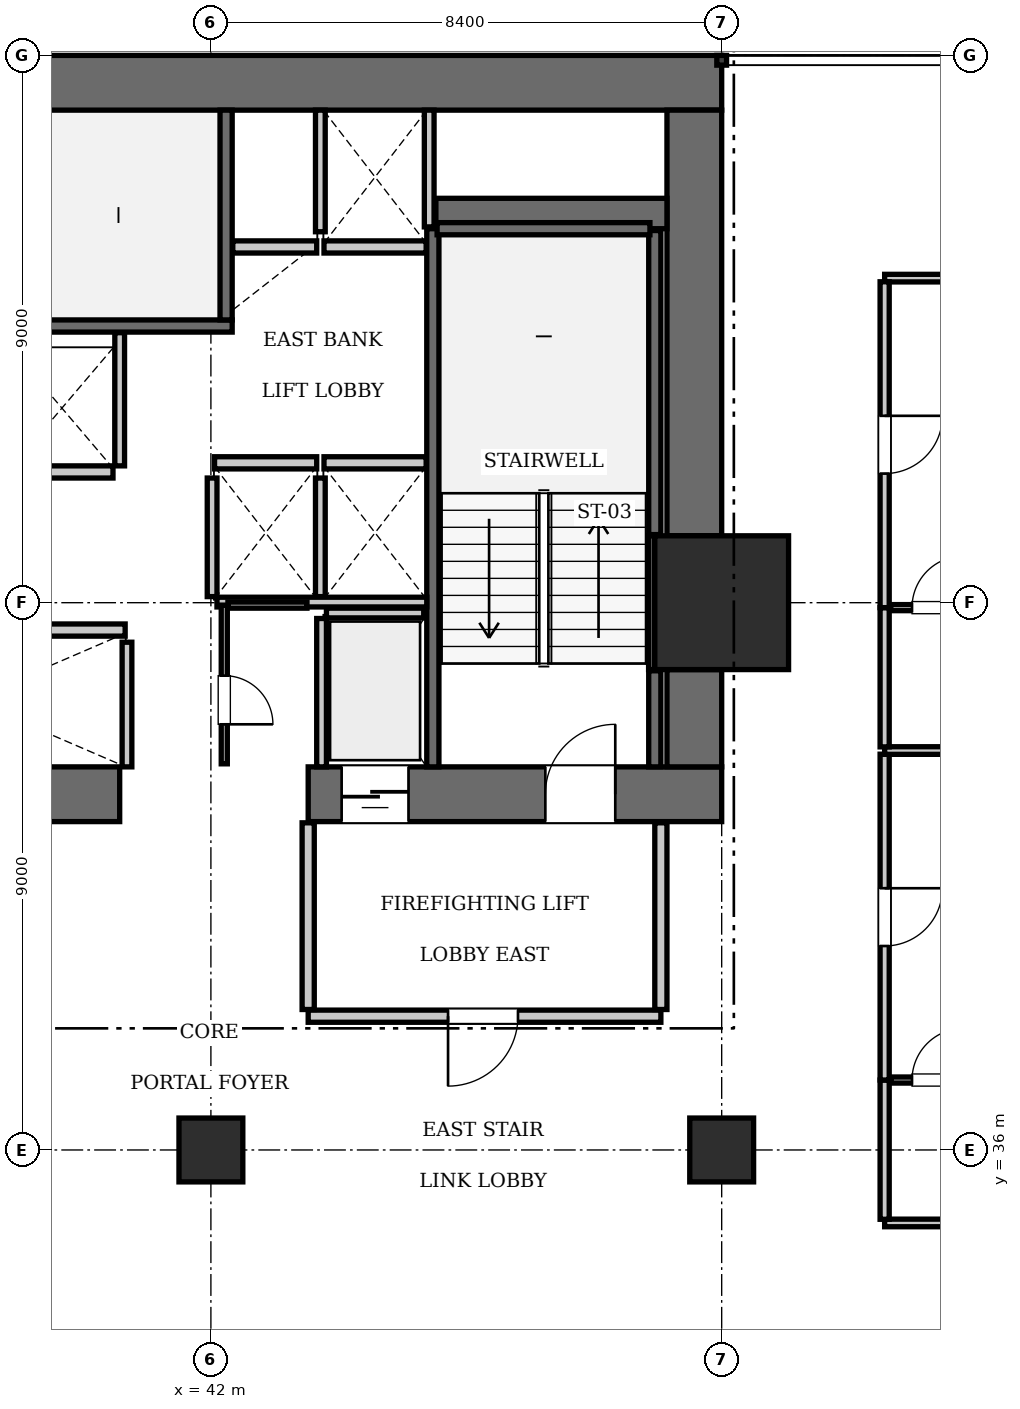
"""IFC4 building model, lengths in metres.
Left out: names, types, materials, properties, quantities, classifications, styles, units other than length and angle.
Written with IfcOpenShell. Run it as: python <this file> out.ifc"""

import sys

from ifc_helpers import new_model, si_unit, direction, frame, frame_2d, origin, origin_2d, place, context, subcontext, project, spatial, rectangle, extrude, element, fill, save


model = new_model("IFC4")
c1 = context("Model", 3, precision=1e-05, world=origin(), true_north=direction((0.0, 1.0)))
c2 = subcontext(c1, "Body", "Model", "MODEL_VIEW")
j1 = project(units=[si_unit("LENGTHUNIT", "METRE"), si_unit("PLANEANGLEUNIT", "RADIAN")], contexts=[c1])
p1 = place(None, origin())
s1 = spatial("IfcSite", under=j1, at=p1, CompositionType="ELEMENT")
p2 = place(p1, origin())
s2 = spatial("IfcBuilding", under=s1, at=p2, CompositionType="ELEMENT")
p3 = place(p2, frame((0.0, 0.0, 92.4)))
s3 = spatial("IfcBuildingStorey", under=s2, at=p3, CompositionType="ELEMENT", Elevation=92.4)
p4 = place(p3, frame((50.4, 45.0, 0.0), z_axis=(0.0, 0.0, 1.0), x_axis=(1.0, 0.0, 0.0)))
e1 = element("IfcColumn", 1, at=p4, inside=s3, PredefinedType="COLUMN", context=c2, shape_type="SweptSolid", body=[
    extrude(rectangle(XDim=2.2, YDim=2.2, at=origin_2d()), origin(), (0.0, 0.0, 1.0), 3.85),
])
p5 = place(p3, frame((25.2, 53.55, 0.0), z_axis=(0.0, 0.0, 1.0), x_axis=(1.0, 0.0, 0.0)))
e2 = element("IfcWall", 2, at=p5, inside=s3, PredefinedType="SHEAR", context=c2, shape_type="SweptSolid", body=[
    extrude(rectangle(XDim=25.2, YDim=0.9, at=frame_2d((12.6, 0.0))), origin(), (0.0, 0.0, 1.0), 3.85),
])
p6 = place(p3, frame((35.1, 41.85, 0.0), z_axis=(0.0, 0.0, 1.0), x_axis=(1.0, 0.0, 0.0)))
e3 = element("IfcWall", 3, at=p6, inside=s3, PredefinedType="SHEAR", context=c2, shape_type="SweptSolid", body=[
    extrude(rectangle(XDim=5.4, YDim=0.9, at=frame_2d((2.7, 0.0))), origin(), (0.0, 0.0, 1.0), 3.85),
])
p7 = place(p3, frame((43.6, 41.85, 0.0), z_axis=(0.0, 0.0, 1.0), x_axis=(1.0, 0.0, 0.0)))
e4 = element("IfcWall", 4, at=p7, inside=s3, PredefinedType="SHEAR", context=c2, shape_type="SweptSolid", body=[
    extrude(rectangle(XDim=6.8, YDim=0.9, at=frame_2d((3.4, 0.0))), origin(), (0.0, 0.0, 1.0), 3.85),
])
p8 = place(p7, frame((3.9, 0.0, 0.0)))
e5 = element("IfcOpeningElement", 5, at=p8, cuts=e4, PredefinedType="OPENING", context=c2, shape_type="SweptSolid", body=[
    extrude(rectangle(XDim=1.15, YDim=2.15, at=frame_2d((0.575, 1.075))), frame((0.0, 0.46, 0.0), z_axis=(0.0, -1.0, 0.0), x_axis=(1.0, 0.0, 0.0)), (0.0, 0.0, 1.0), 0.92),
])
p9 = place(p7, frame((0.55, 0.0, 0.0)))
e6 = element("IfcOpeningElement", 6, at=p9, cuts=e4, PredefinedType="OPENING", context=c2, shape_type="SweptSolid", body=[
    extrude(rectangle(XDim=1.1, YDim=2.2, at=frame_2d((0.55, 1.1))), frame((0.0, 0.46, 0.0), z_axis=(0.0, -1.0, 0.0), x_axis=(1.0, 0.0, 0.0)), (0.0, 0.0, 1.0), 0.92),
])
p10 = place(p3, frame((49.95, 42.3, 0.0), z_axis=(0.0, 0.0, 1.0), x_axis=(0.0, 1.0, 0.0)))
e7 = element("IfcWall", 7, at=p10, inside=s3, PredefinedType="SHEAR", context=c2, shape_type="SweptSolid", body=[
    extrude(rectangle(XDim=1.6, YDim=0.9, at=frame_2d((0.8, 0.0))), origin(), (0.0, 0.0, 1.0), 3.85),
])
p11 = place(p3, frame((49.95, 46.1, 0.0), z_axis=(0.0, 0.0, 1.0), x_axis=(0.0, 1.0, 0.0)))
e8 = element("IfcWall", 8, at=p11, inside=s3, PredefinedType="SHEAR", context=c2, shape_type="SweptSolid", body=[
    extrude(rectangle(XDim=7.0, YDim=0.9, at=frame_2d((3.5, 0.0))), origin(), (0.0, 0.0, 1.0), 3.85),
])
p12 = place(p3, frame((45.7, 51.4, 0.0), z_axis=(0.0, 0.0, 1.0), x_axis=(1.0, 0.0, 0.0)))
e9 = element("IfcWall", 9, at=p12, inside=s3, PredefinedType="SHEAR", context=c2, shape_type="SweptSolid", body=[
    extrude(rectangle(XDim=3.8, YDim=0.5, at=frame_2d((1.9, 0.0))), origin(), (0.0, 0.0, 1.0), 3.85),
])
for number, where, z_axis, x_axis in (
    (10, (42.0, 36.0, 0.0), (0.0, 0.0, 1.0), (1.0, 0.0, 0.0)),
    (11, (50.4, 36.0, 0.0), (0.0, 0.0, 1.0), (1.0, 0.0, 0.0)),
):
    element("IfcColumn", number, at=place(p3, frame(where, z_axis=z_axis, x_axis=x_axis)), inside=s3, PredefinedType="COLUMN", context=c2, shape_type="SweptSolid", body=[
        extrude(rectangle(XDim=1.05, YDim=1.05, at=origin_2d()), origin(), (0.0, 0.0, 1.0), 3.85),
    ])
p13 = place(p3, frame((33.25, 49.55, 0.0), z_axis=(0.0, 0.0, 1.0), x_axis=(1.0, 0.0, 0.0)))
e12 = element("IfcWall", 12, at=p13, inside=s3, PredefinedType="SOLIDWALL", context=c2, shape_type="SweptSolid", body=[
    extrude(rectangle(XDim=9.1, YDim=0.2, at=frame_2d((4.55, 0.0))), origin(), (0.0, 0.0, 1.0), 3.61),
])
p14 = place(p3, frame((42.25, 49.65, 0.0), z_axis=(0.0, 0.0, 1.0), x_axis=(0.0, 1.0, 0.0)))
e13 = element("IfcWall", 13, at=p14, inside=s3, PredefinedType="SOLIDWALL", context=c2, shape_type="SweptSolid", body=[
    extrude(rectangle(XDim=3.45, YDim=0.2, at=frame_2d((1.725, 0.0))), origin(), (0.0, 0.0, 1.0), 3.61),
])
p15 = place(p3, frame((45.65, 42.3, 0.0), z_axis=(0.0, 0.0, 1.0), x_axis=(0.0, 1.0, 0.0)))
e14 = element("IfcWall", 14, at=p15, inside=s3, PredefinedType="SOLIDWALL", context=c2, shape_type="SweptSolid", body=[
    extrude(rectangle(XDim=8.85, YDim=0.2, at=frame_2d((4.425, 0.0))), origin(), (0.0, 0.0, 1.0), 3.61),
])
p16 = place(p3, frame((49.3, 42.3, 0.0), z_axis=(0.0, 0.0, 1.0), x_axis=(0.0, 1.0, 0.0)))
e15 = element("IfcWall", 15, at=p16, inside=s3, PredefinedType="SOLIDWALL", context=c2, shape_type="SweptSolid", body=[
    extrude(rectangle(XDim=1.58, YDim=0.2, at=frame_2d((0.79, 0.0))), origin(), (0.0, 0.0, 1.0), 3.61),
])
p17 = place(p3, frame((49.3, 46.12, 0.0), z_axis=(0.0, 0.0, 1.0), x_axis=(0.0, 1.0, 0.0)))
e16 = element("IfcWall", 16, at=p17, inside=s3, PredefinedType="SOLIDWALL", context=c2, shape_type="SweptSolid", body=[
    extrude(rectangle(XDim=5.0, YDim=0.2, at=frame_2d((2.5, 0.0))), origin(), (0.0, 0.0, 1.0), 3.61),
])
p18 = place(p3, frame((45.72, 51.15, 0.0), z_axis=(0.0, 0.0, 1.0), x_axis=(1.0, 0.0, 0.0)))
e17 = element("IfcWall", 17, at=p18, inside=s3, PredefinedType="SOLIDWALL", context=c2, shape_type="SweptSolid", body=[
    extrude(rectangle(XDim=3.5, YDim=0.2, at=frame_2d((1.75, 0.0))), origin(), (0.0, 0.0, 1.0), 3.61),
])
p19 = place(p3, frame((49.248, 43.9, 0.0), z_axis=(0.0, 0.0, 1.0), x_axis=(0.0, 1.0, 0.0)))
e18 = element("IfcWall", 18, at=p19, inside=s3, PredefinedType="SOLIDWALL", context=c2, shape_type="SweptSolid", body=[
    extrude(rectangle(XDim=2.2, YDim=0.1, at=frame_2d((1.1, 0.0))), origin(), (0.0, 0.0, 1.0), 3.61),
])
for number, where, z_axis, x_axis in (
    (19, (42.06, 47.3, 0.0), (0.0, 0.0, 1.0), (1.0, 0.0, 0.0)),
    (20, (43.86, 47.3, 0.0), (0.0, 0.0, 1.0), (1.0, 0.0, 0.0)),
):
    element("IfcWall", number, at=place(p3, frame(where, z_axis=z_axis, x_axis=x_axis)), inside=s3, PredefinedType="SOLIDWALL", context=c2, shape_type="SweptSolid", body=[
        extrude(rectangle(XDim=1.68, YDim=0.2, at=frame_2d((0.84, 0.0))), origin(), (0.0, 0.0, 1.0), 3.61),
    ])
p20 = place(p3, frame((42.36, 50.85, 0.0), z_axis=(0.0, 0.0, 1.0), x_axis=(1.0, 0.0, 0.0)))
e21 = element("IfcWall", 21, at=p20, inside=s3, PredefinedType="SOLIDWALL", context=c2, shape_type="SweptSolid", body=[
    extrude(rectangle(XDim=1.38, YDim=0.2, at=frame_2d((0.69, 0.0))), origin(), (0.0, 0.0, 1.0), 3.61),
])
p21 = place(p3, frame((43.86, 50.85, 0.0), z_axis=(0.0, 0.0, 1.0), x_axis=(1.0, 0.0, 0.0)))
e22 = element("IfcWall", 22, at=p21, inside=s3, PredefinedType="SOLIDWALL", context=c2, shape_type="SweptSolid", body=[
    extrude(rectangle(XDim=1.68, YDim=0.2, at=frame_2d((0.84, 0.0))), origin(), (0.0, 0.0, 1.0), 3.61),
])
p22 = place(p3, frame((38.91, 44.55, 0.0), z_axis=(0.0, 0.0, 1.0), x_axis=(1.0, 0.0, 0.0)))
e23 = element("IfcWall", 23, at=p22, inside=s3, PredefinedType="SOLIDWALL", context=c2, shape_type="SweptSolid", body=[
    extrude(rectangle(XDim=1.68, YDim=0.2, at=frame_2d((0.84, 0.0))), origin(), (0.0, 0.0, 1.0), 3.61),
])
p23 = place(p3, frame((38.71, 47.15, 0.0), z_axis=(0.0, 0.0, 1.0), x_axis=(1.0, 0.0, 0.0)))
e24 = element("IfcWall", 24, at=p23, inside=s3, PredefinedType="SOLIDWALL", context=c2, shape_type="SweptSolid", body=[
    extrude(rectangle(XDim=1.68, YDim=0.2, at=frame_2d((0.84, 0.0))), origin(), (0.0, 0.0, 1.0), 3.61),
])
p24 = place(p3, frame((43.9, 44.83, 0.0), z_axis=(0.0, 0.0, 1.0), x_axis=(1.0, 0.0, 0.0)))
e25 = element("IfcWall", 25, at=p24, inside=s3, PredefinedType="SOLIDWALL", context=c2, shape_type="SweptSolid", body=[
    extrude(rectangle(XDim=1.6, YDim=0.16, at=frame_2d((0.8, 0.0))), origin(), (0.0, 0.0, 1.0), 3.61),
])
p25 = place(p3, frame((43.82, 42.3, 0.0), z_axis=(0.0, 0.0, 1.0), x_axis=(0.0, 1.0, 0.0)))
e26 = element("IfcWall", 26, at=p25, inside=s3, PredefinedType="SOLIDWALL", context=c2, shape_type="SweptSolid", body=[
    extrude(rectangle(XDim=2.44, YDim=0.16, at=frame_2d((1.22, 0.0))), origin(), (0.0, 0.0, 1.0), 3.61),
])
for number, where, z_axis, x_axis in (
    (27, (42.02, 45.1, 0.0), (0.0, 0.0, 1.0), (0.0, 1.0, 0.0)),
    (28, (43.8, 45.1, 0.0), (0.0, 0.0, 1.0), (0.0, 1.0, 0.0)),
):
    element("IfcWall", number, at=place(p3, frame(where, z_axis=z_axis, x_axis=x_axis)), inside=s3, PredefinedType="SOLIDWALL", context=c2, shape_type="SweptSolid", body=[
        extrude(rectangle(XDim=1.95, YDim=0.16, at=frame_2d((0.975, 0.0))), origin(), (0.0, 0.0, 1.0), 3.61),
    ])
p26 = place(p3, frame((42.1, 45.01, 0.0), z_axis=(0.0, 0.0, 1.0), x_axis=(1.0, 0.0, 0.0)))
e29 = element("IfcWall", 29, at=p26, inside=s3, PredefinedType="SOLIDWALL", context=c2, shape_type="SweptSolid", body=[
    extrude(rectangle(XDim=3.45, YDim=0.16, at=frame_2d((1.725, 0.0))), origin(), (0.0, 0.0, 1.0), 3.61),
])
p27 = place(p3, frame((45.59, 51.18, 0.0), z_axis=(0.0, 0.0, 1.0), x_axis=(0.0, 1.0, 0.0)))
e30 = element("IfcWall", 30, at=p27, inside=s3, PredefinedType="SOLIDWALL", context=c2, shape_type="SweptSolid", body=[
    extrude(rectangle(XDim=1.92, YDim=0.16, at=frame_2d((0.96, 0.0))), origin(), (0.0, 0.0, 1.0), 3.61),
])
p28 = place(p3, frame((43.8, 51.1, 0.0), z_axis=(0.0, 0.0, 1.0), x_axis=(0.0, 1.0, 0.0)))
e31 = element("IfcWall", 31, at=p28, inside=s3, PredefinedType="SOLIDWALL", context=c2, shape_type="SweptSolid", body=[
    extrude(rectangle(XDim=2.0, YDim=0.16, at=frame_2d((1.0, 0.0))), origin(), (0.0, 0.0, 1.0), 3.61),
])
p29 = place(p3, frame((40.62, 42.3, 0.0), z_axis=(0.0, 0.0, 1.0), x_axis=(0.0, 1.0, 0.0)))
e32 = element("IfcWall", 32, at=p29, inside=s3, PredefinedType="SOLIDWALL", context=c2, shape_type="SweptSolid", body=[
    extrude(rectangle(XDim=2.05, YDim=0.16, at=frame_2d((1.025, 0.0))), origin(), (0.0, 0.0, 1.0), 3.61),
])
p30 = place(p3, frame((40.5, 47.25, 0.0), z_axis=(0.0, 0.0, 1.0), x_axis=(0.0, 1.0, 0.0)))
e33 = element("IfcWall", 33, at=p30, inside=s3, PredefinedType="SOLIDWALL", context=c2, shape_type="SweptSolid", body=[
    extrude(rectangle(XDim=2.19, YDim=0.16, at=frame_2d((1.095, 0.0))), origin(), (0.0, 0.0, 1.0), 3.61),
])
p31 = place(p3, frame((43.6, 38.2, 0.0), z_axis=(0.0, 0.0, 1.0), x_axis=(1.0, 0.0, 0.0)))
e34 = element("IfcWall", 34, at=p31, inside=s3, PredefinedType="PARTITIONING", context=c2, shape_type="SweptSolid", body=[
    extrude(rectangle(XDim=5.8, YDim=0.2, at=frame_2d((2.9, 0.0))), origin(), (0.0, 0.0, 1.0), 3.61),
])
p32 = place(p31, frame((2.3, 0.0, 0.0)))
e35 = element("IfcOpeningElement", 35, at=p32, cuts=e34, PredefinedType="OPENING", context=c2, shape_type="SweptSolid", body=[
    extrude(rectangle(XDim=1.15, YDim=2.15, at=frame_2d((0.575, 1.075))), frame((0.0, 0.11, 0.0), z_axis=(0.0, -1.0, 0.0), x_axis=(1.0, 0.0, 0.0)), (0.0, 0.0, 1.0), 0.22),
])
for number, where, z_axis, x_axis in (
    (36, (43.6, 38.31, 0.0), (0.0, 0.0, 1.0), (0.0, 1.0, 0.0)),
    (37, (49.4, 38.31, 0.0), (0.0, 0.0, 1.0), (0.0, 1.0, 0.0)),
):
    element("IfcWall", number, at=place(p3, frame(where, z_axis=z_axis, x_axis=x_axis)), inside=s3, PredefinedType="PARTITIONING", context=c2, shape_type="SweptSolid", body=[
        extrude(rectangle(XDim=3.07, YDim=0.2, at=frame_2d((1.535, 0.0))), origin(), (0.0, 0.0, 1.0), 3.61),
    ])
p33 = place(p3, frame((42.22, 42.35, 0.0), z_axis=(0.0, 0.0, 1.0), x_axis=(0.0, 1.0, 0.0)))
e38 = element("IfcWall", 38, at=p33, inside=s3, PredefinedType="PARTITIONING", context=c2, shape_type="SweptSolid", body=[
    extrude(rectangle(XDim=2.61, YDim=0.1, at=frame_2d((1.305, 0.0))), origin(), (0.0, 0.0, 1.0), 3.61),
])
p34 = place(p33, frame((0.65, 0.0, 0.0)))
e39 = element("IfcOpeningElement", 39, at=p34, cuts=e38, PredefinedType="OPENING", context=c2, shape_type="SweptSolid", body=[
    extrude(rectangle(XDim=0.8, YDim=2.05, at=frame_2d((0.4, 1.025))), frame((0.0, 0.06, 0.0), z_axis=(0.0, -1.0, 0.0), x_axis=(1.0, 0.0, 0.0)), (0.0, 0.0, 1.0), 0.12),
])
p35 = place(p3, frame((42.28, 44.96, 0.0), z_axis=(0.0, 0.0, 1.0), x_axis=(1.0, 0.0, 0.0)))
e40 = element("IfcWall", 40, at=p35, inside=s3, PredefinedType="PARTITIONING", context=c2, shape_type="SweptSolid", body=[
    extrude(rectangle(XDim=1.3, YDim=0.1, at=frame_2d((0.65, 0.0))), origin(), (0.0, 0.0, 1.0), 3.61),
])
p36 = place(p3, frame((53.08, 34.8, 0.0), z_axis=(0.0, 0.0, 1.0), x_axis=(1.0, 0.0, 0.0)))
e41 = element("IfcWall", 41, at=p36, inside=s3, PredefinedType="PARTITIONING", context=c2, shape_type="SweptSolid", body=[
    extrude(rectangle(XDim=11.62, YDim=0.125, at=frame_2d((5.81, 0.0))), origin(), (0.0, 0.0, 1.0), 3.61),
])
p37 = place(p3, frame((53.08, 50.337, 0.0), z_axis=(0.0, 0.0, 1.0), x_axis=(1.0, 0.0, 0.0)))
e42 = element("IfcWall", 42, at=p37, inside=s3, PredefinedType="PARTITIONING", context=c2, shape_type="SweptSolid", body=[
    extrude(rectangle(XDim=8.38, YDim=0.125, at=frame_2d((4.19, 0.0))), origin(), (0.0, 0.0, 1.0), 3.61),
])
p38 = place(p3, frame((53.08, 34.86, 0.0), z_axis=(0.0, 0.0, 1.0), x_axis=(0.0, 1.0, 0.0)))
e43 = element("IfcWall", 43, at=p38, inside=s3, PredefinedType="PARTITIONING", context=c2, shape_type="SweptSolid", body=[
    extrude(rectangle(XDim=2.29, YDim=0.15, at=frame_2d((1.145, 0.0))), origin(), (0.0, 0.0, 1.0), 3.61),
])
p39 = place(p3, frame((53.08, 37.15, 0.0), z_axis=(0.0, 0.0, 1.0), x_axis=(0.0, 1.0, 0.0)))
e44 = element("IfcWall", 44, at=p39, inside=s3, PredefinedType="PARTITIONING", context=c2, shape_type="SweptSolid", body=[
    extrude(rectangle(XDim=5.359, YDim=0.15, at=frame_2d((2.679, 0.0))), origin(), (0.0, 0.0, 1.0), 3.61),
])
p40 = place(p39, frame((2.204, 0.0, 0.0)))
e45 = element("IfcOpeningElement", 45, at=p40, cuts=e44, PredefinedType="OPENING", context=c2, shape_type="SweptSolid", body=[
    extrude(rectangle(XDim=0.95, YDim=2.15, at=frame_2d((0.475, 1.075))), frame((0.0, 0.085, 0.0), z_axis=(0.0, -1.0, 0.0), x_axis=(1.0, 0.0, 0.0)), (0.0, 0.0, 1.0), 0.17),
])
p41 = place(p3, frame((53.18, 37.15, 0.0), z_axis=(0.0, 0.0, 1.0), x_axis=(1.0, 0.0, 0.0)))
e46 = element("IfcWall", 46, at=p41, inside=s3, PredefinedType="PARTITIONING", context=c2, shape_type="SweptSolid", body=[
    extrude(rectangle(XDim=2.3, YDim=0.1, at=frame_2d((1.15, 0.0))), origin(), (0.0, 0.0, 1.0), 3.61),
])
p42 = place(p41, frame((0.35, 0.0, 0.0)))
e47 = element("IfcOpeningElement", 47, at=p42, cuts=e46, PredefinedType="OPENING", context=c2, shape_type="SweptSolid", body=[
    extrude(rectangle(XDim=0.85, YDim=2.1, at=frame_2d((0.425, 1.05))), frame((0.0, 0.06, 0.0), z_axis=(0.0, -1.0, 0.0), x_axis=(1.0, 0.0, 0.0)), (0.0, 0.0, 1.0), 0.12),
])
p43 = place(p3, frame((53.08, 42.569, 0.0), z_axis=(0.0, 0.0, 1.0), x_axis=(1.0, 0.0, 0.0)))
e48 = element("IfcWall", 48, at=p43, inside=s3, PredefinedType="PARTITIONING", context=c2, shape_type="SweptSolid", body=[
    extrude(rectangle(XDim=11.62, YDim=0.125, at=frame_2d((5.81, 0.0))), origin(), (0.0, 0.0, 1.0), 3.61),
])
p44 = place(p3, frame((53.08, 42.629, 0.0), z_axis=(0.0, 0.0, 1.0), x_axis=(0.0, 1.0, 0.0)))
e49 = element("IfcWall", 49, at=p44, inside=s3, PredefinedType="PARTITIONING", context=c2, shape_type="SweptSolid", body=[
    extrude(rectangle(XDim=2.29, YDim=0.15, at=frame_2d((1.145, 0.0))), origin(), (0.0, 0.0, 1.0), 3.61),
])
p45 = place(p3, frame((53.08, 44.919, 0.0), z_axis=(0.0, 0.0, 1.0), x_axis=(0.0, 1.0, 0.0)))
e50 = element("IfcWall", 50, at=p45, inside=s3, PredefinedType="PARTITIONING", context=c2, shape_type="SweptSolid", body=[
    extrude(rectangle(XDim=5.359, YDim=0.15, at=frame_2d((2.679, 0.0))), origin(), (0.0, 0.0, 1.0), 3.61),
])
p46 = place(p45, frame((2.204, 0.0, 0.0)))
e51 = element("IfcOpeningElement", 51, at=p46, cuts=e50, PredefinedType="OPENING", context=c2, shape_type="SweptSolid", body=[
    extrude(rectangle(XDim=0.95, YDim=2.15, at=frame_2d((0.475, 1.075))), frame((0.0, 0.085, 0.0), z_axis=(0.0, -1.0, 0.0), x_axis=(1.0, 0.0, 0.0)), (0.0, 0.0, 1.0), 0.17),
])
p47 = place(p3, frame((53.18, 44.919, 0.0), z_axis=(0.0, 0.0, 1.0), x_axis=(1.0, 0.0, 0.0)))
e52 = element("IfcWall", 52, at=p47, inside=s3, PredefinedType="PARTITIONING", context=c2, shape_type="SweptSolid", body=[
    extrude(rectangle(XDim=2.3, YDim=0.1, at=frame_2d((1.15, 0.0))), origin(), (0.0, 0.0, 1.0), 2.999),
])
p48 = place(p47, frame((0.35, 0.0, 0.0)))
e53 = element("IfcOpeningElement", 53, at=p48, cuts=e52, PredefinedType="OPENING", context=c2, shape_type="SweptSolid", body=[
    extrude(rectangle(XDim=0.85, YDim=2.1, at=frame_2d((0.425, 1.05))), frame((0.0, 0.06, 0.0), z_axis=(0.0, -1.0, 0.0), x_axis=(1.0, 0.0, 0.0)), (0.0, 0.0, 1.0), 0.12),
])
p49 = place(p8, origin())
e54 = element("IfcDoor", 54, at=p49, inside=s3, OperationType="SINGLE_SWING_RIGHT", PredefinedType="DOOR", context=c2, shape_type="SweptSolid", body=[
    extrude(rectangle(XDim=1.15, YDim=2.15, at=frame_2d((0.575, 1.075))), frame((0.0, 0.025, 0.0), z_axis=(0.0, -1.0, 0.0), x_axis=(1.0, 0.0, 0.0)), (0.0, 0.0, 1.0), 0.05),
])
fill(e5, e54)
p50 = place(p9, frame((1.1, 0.0, 0.0), z_axis=(0.0, 0.0, 1.0), x_axis=(-1.0, 0.0, 0.0)))
e55 = element("IfcDoor", 55, at=p50, inside=s3, OperationType="SLIDING_TO_LEFT", PredefinedType="DOOR", context=c2, shape_type="SweptSolid", body=[
    extrude(rectangle(XDim=1.1, YDim=2.2, at=frame_2d((0.55, 1.1))), frame((0.0, 0.025, 0.0), z_axis=(0.0, -1.0, 0.0), x_axis=(1.0, 0.0, 0.0)), (0.0, 0.0, 1.0), 0.05),
])
fill(e6, e55)
p51 = place(p32, frame((1.15, 0.0, 0.0), z_axis=(0.0, 0.0, 1.0), x_axis=(-1.0, 0.0, 0.0)))
e56 = element("IfcDoor", 56, at=p51, inside=s3, OperationType="SINGLE_SWING_RIGHT", PredefinedType="DOOR", context=c2, shape_type="SweptSolid", body=[
    extrude(rectangle(XDim=1.15, YDim=2.15, at=frame_2d((0.575, 1.075))), frame((0.0, 0.025, 0.0), z_axis=(0.0, -1.0, 0.0), x_axis=(1.0, 0.0, 0.0)), (0.0, 0.0, 1.0), 0.05),
])
fill(e35, e56)
p52 = place(p34, frame((0.8, 0.0, 0.0), z_axis=(0.0, 0.0, 1.0), x_axis=(-1.0, 0.0, 0.0)))
e57 = element("IfcDoor", 57, at=p52, inside=s3, OperationType="SINGLE_SWING_RIGHT", PredefinedType="DOOR", context=c2, shape_type="SweptSolid", body=[
    extrude(rectangle(XDim=0.8, YDim=2.05, at=frame_2d((0.4, 1.025))), frame((0.0, 0.025, 0.0), z_axis=(0.0, -1.0, 0.0), x_axis=(1.0, 0.0, 0.0)), (0.0, 0.0, 1.0), 0.05),
])
fill(e39, e57)
p53 = place(p42, origin())
e58 = element("IfcDoor", 58, at=p53, inside=s3, OperationType="SINGLE_SWING_RIGHT", PredefinedType="DOOR", context=c2, shape_type="SweptSolid", body=[
    extrude(rectangle(XDim=0.85, YDim=2.1, at=frame_2d((0.425, 1.05))), frame((0.0, 0.025, 0.0), z_axis=(0.0, -1.0, 0.0), x_axis=(1.0, 0.0, 0.0)), (0.0, 0.0, 1.0), 0.05),
])
fill(e47, e58)
p54 = place(p40, frame((0.95, 0.0, 0.0), z_axis=(0.0, 0.0, 1.0), x_axis=(-1.0, 0.0, 0.0)))
e59 = element("IfcDoor", 59, at=p54, inside=s3, OperationType="SINGLE_SWING_LEFT", PredefinedType="DOOR", context=c2, shape_type="SweptSolid", body=[
    extrude(rectangle(XDim=0.95, YDim=2.15, at=frame_2d((0.475, 1.075))), frame((0.0, 0.025, 0.0), z_axis=(0.0, -1.0, 0.0), x_axis=(1.0, 0.0, 0.0)), (0.0, 0.0, 1.0), 0.05),
])
fill(e45, e59)
p55 = place(p48, origin())
e60 = element("IfcDoor", 60, at=p55, inside=s3, OperationType="SINGLE_SWING_RIGHT", PredefinedType="DOOR", context=c2, shape_type="SweptSolid", body=[
    extrude(rectangle(XDim=0.85, YDim=2.1, at=frame_2d((0.425, 1.05))), frame((0.0, 0.025, 0.0), z_axis=(0.0, -1.0, 0.0), x_axis=(1.0, 0.0, 0.0)), (0.0, 0.0, 1.0), 0.05),
])
fill(e53, e60)
p56 = place(p46, frame((0.95, 0.0, 0.0), z_axis=(0.0, 0.0, 1.0), x_axis=(-1.0, 0.0, 0.0)))
e61 = element("IfcDoor", 61, at=p56, inside=s3, OperationType="SINGLE_SWING_LEFT", PredefinedType="DOOR", context=c2, shape_type="SweptSolid", body=[
    extrude(rectangle(XDim=0.95, YDim=2.15, at=frame_2d((0.475, 1.075))), frame((0.0, 0.025, 0.0), z_axis=(0.0, -1.0, 0.0), x_axis=(1.0, 0.0, 0.0)), (0.0, 0.0, 1.0), 0.05),
])
fill(e51, e61)
save(model, sys.argv[1])
